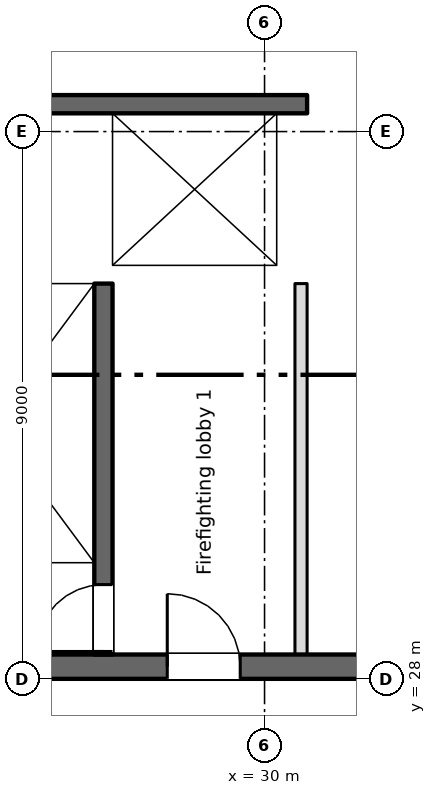
"""IFC4 building model, lengths in metres.
Left out: names, types, materials, properties, quantities, classifications, styles, units other than length and angle.
Written with IfcOpenShell. Run it as: python <this file> out.ifc"""

import sys

from ifc_helpers import new_model, si_unit, direction, frame, frame_2d, origin, place, context, subcontext, project, spatial, rectangle, extrude, element, fill, save


model = new_model("IFC4")
c1 = context("Model", 3, precision=1e-05, world=origin(), true_north=direction((0.0, 1.0)))
c2 = subcontext(c1, "Body", "Model", "MODEL_VIEW")
j1 = project(units=[si_unit("LENGTHUNIT", "METRE"), si_unit("PLANEANGLEUNIT", "RADIAN")], contexts=[c1])
p1 = place(None, origin())
s1 = spatial("IfcSite", under=j1, at=p1, CompositionType="ELEMENT")
p2 = place(p1, origin())
s2 = spatial("IfcBuilding", under=s1, at=p2, CompositionType="ELEMENT")
p3 = place(p2, frame((0.0, 0.0, 178.0)))
s3 = spatial("IfcBuildingStorey", under=s2, at=p3, CompositionType="ELEMENT", Elevation=178.0)
p4 = place(p3, frame((6.6, 28.2, 0.0), z_axis=(0.0, 0.0, 1.0), x_axis=(1.0, 0.0, 0.0)))
e1 = element("IfcWall", 1, at=p4, inside=s3, PredefinedType="SHEAR", context=c2, shape_type="SweptSolid", body=[
    extrude(rectangle(XDim=57.9, YDim=0.4, at=frame_2d((28.95, 0.0))), origin(), (0.0, 0.0, 1.0), 3.35),
])
p5 = place(p4, frame((12.163, 0.0, 0.0)))
e2 = element("IfcOpeningElement", 2, at=p5, cuts=e1, PredefinedType="OPENING", context=c2, shape_type="SweptSolid", body=[
    extrude(rectangle(XDim=0.9, YDim=2.1, at=frame_2d((0.45, 1.05))), frame((0.0, 0.21, 0.0), z_axis=(0.0, -1.0, 0.0), x_axis=(1.0, 0.0, 0.0)), (0.0, 0.0, 1.0), 0.42),
])
p6 = place(p4, frame((14.738, 0.0, 0.0)))
e3 = element("IfcOpeningElement", 3, at=p6, cuts=e1, PredefinedType="OPENING", context=c2, shape_type="SweptSolid", body=[
    extrude(rectangle(XDim=0.9, YDim=2.1, at=frame_2d((0.45, 1.05))), frame((0.0, 0.21, 0.0), z_axis=(0.0, -1.0, 0.0), x_axis=(1.0, 0.0, 0.0)), (0.0, 0.0, 1.0), 0.42),
])
p7 = place(p4, frame((49.163, 0.0, 0.0)))
e4 = element("IfcOpeningElement", 4, at=p7, cuts=e1, PredefinedType="OPENING", context=c2, shape_type="SweptSolid", body=[
    extrude(rectangle(XDim=0.9, YDim=2.1, at=frame_2d((0.45, 1.05))), frame((0.0, 0.21, 0.0), z_axis=(0.0, -1.0, 0.0), x_axis=(1.0, 0.0, 0.0)), (0.0, 0.0, 1.0), 0.42),
])
p8 = place(p4, frame((51.738, 0.0, 0.0)))
e5 = element("IfcOpeningElement", 5, at=p8, cuts=e1, PredefinedType="OPENING", context=c2, shape_type="SweptSolid", body=[
    extrude(rectangle(XDim=0.9, YDim=2.1, at=frame_2d((0.45, 1.05))), frame((0.0, 0.21, 0.0), z_axis=(0.0, -1.0, 0.0), x_axis=(1.0, 0.0, 0.0)), (0.0, 0.0, 1.0), 0.42),
])
p9 = place(p4, frame((1.45, 0.0, 0.0)))
e6 = element("IfcOpeningElement", 6, at=p9, cuts=e1, PredefinedType="OPENING", context=c2, shape_type="SweptSolid", body=[
    extrude(rectangle(XDim=0.9, YDim=2.1, at=frame_2d((0.45, 1.05))), frame((0.0, 0.21, 0.0), z_axis=(0.0, -1.0, 0.0), x_axis=(1.0, 0.0, 0.0)), (0.0, 0.0, 1.0), 0.42),
])
p10 = place(p4, frame((4.8, 0.0, 0.0)))
e7 = element("IfcOpeningElement", 7, at=p10, cuts=e1, PredefinedType="OPENING", context=c2, shape_type="SweptSolid", body=[
    extrude(rectangle(XDim=1.2, YDim=2.1, at=frame_2d((0.6, 1.05))), frame((0.0, 0.21, 0.0), z_axis=(0.0, -1.0, 0.0), x_axis=(1.0, 0.0, 0.0)), (0.0, 0.0, 1.0), 0.42),
])
p11 = place(p4, frame((31.8, 0.0, 0.0)))
e8 = element("IfcOpeningElement", 8, at=p11, cuts=e1, PredefinedType="OPENING", context=c2, shape_type="SweptSolid", body=[
    extrude(rectangle(XDim=1.2, YDim=2.1, at=frame_2d((0.6, 1.05))), frame((0.0, 0.21, 0.0), z_axis=(0.0, -1.0, 0.0), x_axis=(1.0, 0.0, 0.0)), (0.0, 0.0, 1.0), 0.42),
])
p12 = place(p4, frame((55.3, 0.0, 0.0)))
e9 = element("IfcOpeningElement", 9, at=p12, cuts=e1, PredefinedType="OPENING", context=c2, shape_type="SweptSolid", body=[
    extrude(rectangle(XDim=1.2, YDim=2.1, at=frame_2d((0.6, 1.05))), frame((0.0, 0.21, 0.0), z_axis=(0.0, -1.0, 0.0), x_axis=(1.0, 0.0, 0.0)), (0.0, 0.0, 1.0), 0.42),
])
p13 = place(p4, frame((21.8, 0.0, 0.0)))
e10 = element("IfcOpeningElement", 10, at=p13, cuts=e1, PredefinedType="OPENING", context=c2, shape_type="SweptSolid", body=[
    extrude(rectangle(XDim=1.2, YDim=2.1, at=frame_2d((0.6, 1.05))), frame((0.0, 0.21, 0.0), z_axis=(0.0, -1.0, 0.0), x_axis=(1.0, 0.0, 0.0)), (0.0, 0.0, 1.0), 0.42),
])
p14 = place(p4, frame((41.8, 0.0, 0.0)))
e11 = element("IfcOpeningElement", 11, at=p14, cuts=e1, PredefinedType="OPENING", context=c2, shape_type="SweptSolid", body=[
    extrude(rectangle(XDim=1.2, YDim=2.1, at=frame_2d((0.6, 1.05))), frame((0.0, 0.21, 0.0), z_axis=(0.0, -1.0, 0.0), x_axis=(1.0, 0.0, 0.0)), (0.0, 0.0, 1.0), 0.42),
])
p15 = place(p4, frame((24.95, 0.0, 0.0)))
e12 = element("IfcOpeningElement", 12, at=p15, cuts=e1, PredefinedType="OPENING", context=c2, shape_type="SweptSolid", body=[
    extrude(rectangle(XDim=2.4, YDim=2.1, at=frame_2d((1.2, 1.05))), frame((0.0, 0.21, 0.0), z_axis=(0.0, -1.0, 0.0), x_axis=(1.0, 0.0, 0.0)), (0.0, 0.0, 1.0), 0.42),
])
p16 = place(p4, frame((37.45, 0.0, 0.0)))
e13 = element("IfcOpeningElement", 13, at=p16, cuts=e1, PredefinedType="OPENING", context=c2, shape_type="SweptSolid", body=[
    extrude(rectangle(XDim=2.4, YDim=2.1, at=frame_2d((1.2, 1.05))), frame((0.0, 0.21, 0.0), z_axis=(0.0, -1.0, 0.0), x_axis=(1.0, 0.0, 0.0)), (0.0, 0.0, 1.0), 0.42),
])
p17 = place(p4, frame((8.1, 0.0, 0.0)))
e14 = element("IfcOpeningElement", 14, at=p17, cuts=e1, PredefinedType="OPENING", context=c2, shape_type="SweptSolid", body=[
    extrude(rectangle(XDim=2.4, YDim=2.1, at=frame_2d((1.2, 1.05))), frame((0.0, 0.21, 0.0), z_axis=(0.0, -1.0, 0.0), x_axis=(1.0, 0.0, 0.0)), (0.0, 0.0, 1.0), 0.42),
])
p18 = place(p4, frame((28.95, 0.0, 0.0)))
e15 = element("IfcOpeningElement", 15, at=p18, cuts=e1, PredefinedType="OPENING", context=c2, shape_type="SweptSolid", body=[
    extrude(rectangle(XDim=0.9, YDim=2.1, at=frame_2d((0.45, 1.05))), frame((0.0, 0.21, 0.0), z_axis=(0.0, -1.0, 0.0), x_axis=(1.0, 0.0, 0.0)), (0.0, 0.0, 1.0), 0.42),
])
p19 = place(p4, frame((34.95, 0.0, 0.0)))
e16 = element("IfcOpeningElement", 16, at=p19, cuts=e1, PredefinedType="OPENING", context=c2, shape_type="SweptSolid", body=[
    extrude(rectangle(XDim=0.9, YDim=2.1, at=frame_2d((0.45, 1.05))), frame((0.0, 0.21, 0.0), z_axis=(0.0, -1.0, 0.0), x_axis=(1.0, 0.0, 0.0)), (0.0, 0.0, 1.0), 0.42),
])
p20 = place(p3, frame((27.35, 28.4, 0.0), z_axis=(0.0, 0.0, 1.0), x_axis=(0.0, 1.0, 0.0)))
e17 = element("IfcWall", 17, at=p20, inside=s3, PredefinedType="SHEAR", context=c2, shape_type="SweptSolid", body=[
    extrude(rectangle(XDim=6.1, YDim=0.3, at=frame_2d((3.05, 0.0))), origin(), (0.0, 0.0, 1.0), 3.35),
])
p21 = place(p20, frame((0.05, 0.0, 0.0)))
e18 = element("IfcOpeningElement", 18, at=p21, cuts=e17, PredefinedType="OPENING", context=c2, shape_type="SweptSolid", body=[
    extrude(rectangle(XDim=1.1, YDim=2.1, at=frame_2d((0.55, 1.05))), frame((0.0, 0.16, 0.0), z_axis=(0.0, -1.0, 0.0), x_axis=(1.0, 0.0, 0.0)), (0.0, 0.0, 1.0), 0.32),
])
p22 = place(p3, frame((18.5, 34.65, 0.0), z_axis=(0.0, 0.0, 1.0), x_axis=(1.0, 0.0, 0.0)))
e19 = element("IfcWall", 19, at=p22, inside=s3, PredefinedType="SHEAR", context=c2, shape_type="SweptSolid", body=[
    extrude(rectangle(XDim=12.2, YDim=0.3, at=frame_2d((6.1, 0.0))), origin(), (0.0, 0.0, 1.0), 3.35),
])
p23 = place(p22, frame((9.8, 0.0, 0.0)))
e20 = element("IfcOpeningElement", 20, at=p23, cuts=e19, PredefinedType="OPENING", context=c2, shape_type="SweptSolid", body=[
    extrude(rectangle(XDim=1.1, YDim=2.1, at=frame_2d((0.55, 1.05))), frame((0.0, 0.16, 0.0), z_axis=(0.0, -1.0, 0.0), x_axis=(1.0, 0.0, 0.0)), (0.0, 0.0, 1.0), 0.32),
])
p24 = place(p3, frame((30.7, 37.45, 0.0), z_axis=(0.0, 0.0, 1.0), x_axis=(-1.0, 0.0, 0.0)))
e21 = element("IfcWall", 21, at=p24, inside=s3, PredefinedType="SHEAR", context=c2, shape_type="SweptSolid", body=[
    extrude(rectangle(XDim=12.2, YDim=0.3, at=frame_2d((6.1, 0.0))), origin(), (0.0, 0.0, 1.0), 3.35),
])
p25 = place(p24, frame((7.4, 0.0, 0.0)))
e22 = element("IfcOpeningElement", 22, at=p25, cuts=e21, PredefinedType="OPENING", context=c2, shape_type="SweptSolid", body=[
    extrude(rectangle(XDim=0.9, YDim=2.1, at=frame_2d((0.45, 1.05))), frame((0.0, 0.16, 0.0), z_axis=(0.0, -1.0, 0.0), x_axis=(1.0, 0.0, 0.0)), (0.0, 0.0, 1.0), 0.32),
])
p26 = place(p3, frame((27.35, 34.8, 0.0), z_axis=(0.0, 0.0, 1.0), x_axis=(0.0, 1.0, 0.0)))
e23 = element("IfcWall", 23, at=p26, inside=s3, PredefinedType="SHEAR", context=c2, shape_type="SweptSolid", body=[
    extrude(rectangle(XDim=2.5, YDim=0.3, at=frame_2d((1.25, 0.0))), origin(), (0.0, 0.0, 1.0), 3.35),
])
p27 = place(p3, frame((30.45, 34.8, 0.0), z_axis=(0.0, 0.0, 1.0), x_axis=(0.0, 1.0, 0.0)))
e24 = element("IfcWall", 24, at=p27, inside=s3, PredefinedType="SHEAR", context=c2, shape_type="SweptSolid", body=[
    extrude(rectangle(XDim=2.5, YDim=0.5, at=frame_2d((1.25, 0.0))), origin(), (0.0, 0.0, 1.0), 3.35),
])
p28 = place(p3, frame((30.6, 28.4, 0.0), z_axis=(0.0, 0.0, 1.0), x_axis=(0.0, 1.0, 0.0)))
e25 = element("IfcWall", 25, at=p28, inside=s3, PredefinedType="PARTITIONING", context=c2, shape_type="SweptSolid", body=[
    extrude(rectangle(XDim=6.1, YDim=0.2, at=frame_2d((3.05, 0.0))), origin(), (0.0, 0.0, 1.0), 3.35),
])
p29 = place(p23, origin())
e26 = element("IfcDoor", 26, at=p29, inside=s3, OperationType="SLIDING_TO_LEFT", PredefinedType="DOOR", context=c2, shape_type="SweptSolid", body=[
    extrude(rectangle(XDim=1.1, YDim=2.1, at=frame_2d((0.55, 1.05))), frame((0.0, 0.025, 0.0), z_axis=(0.0, -1.0, 0.0), x_axis=(1.0, 0.0, 0.0)), (0.0, 0.0, 1.0), 0.05),
])
fill(e20, e26)
p30 = place(p21, origin())
e27 = element("IfcDoor", 27, at=p30, inside=s3, OperationType="SINGLE_SWING_LEFT", PredefinedType="DOOR", context=c2, shape_type="SweptSolid", body=[
    extrude(rectangle(XDim=1.1, YDim=2.1, at=frame_2d((0.55, 1.05))), frame((0.0, 0.025, 0.0), z_axis=(0.0, -1.0, 0.0), x_axis=(1.0, 0.0, 0.0)), (0.0, 0.0, 1.0), 0.05),
])
fill(e18, e27)
p31 = place(p13, origin())
e28 = element("IfcDoor", 28, at=p31, inside=s3, OperationType="SINGLE_SWING_LEFT", PredefinedType="DOOR", context=c2, shape_type="SweptSolid", body=[
    extrude(rectangle(XDim=1.2, YDim=2.1, at=frame_2d((0.6, 1.05))), frame((0.0, 0.025, 0.0), z_axis=(0.0, -1.0, 0.0), x_axis=(1.0, 0.0, 0.0)), (0.0, 0.0, 1.0), 0.05),
])
fill(e10, e28)
save(model, sys.argv[1])
